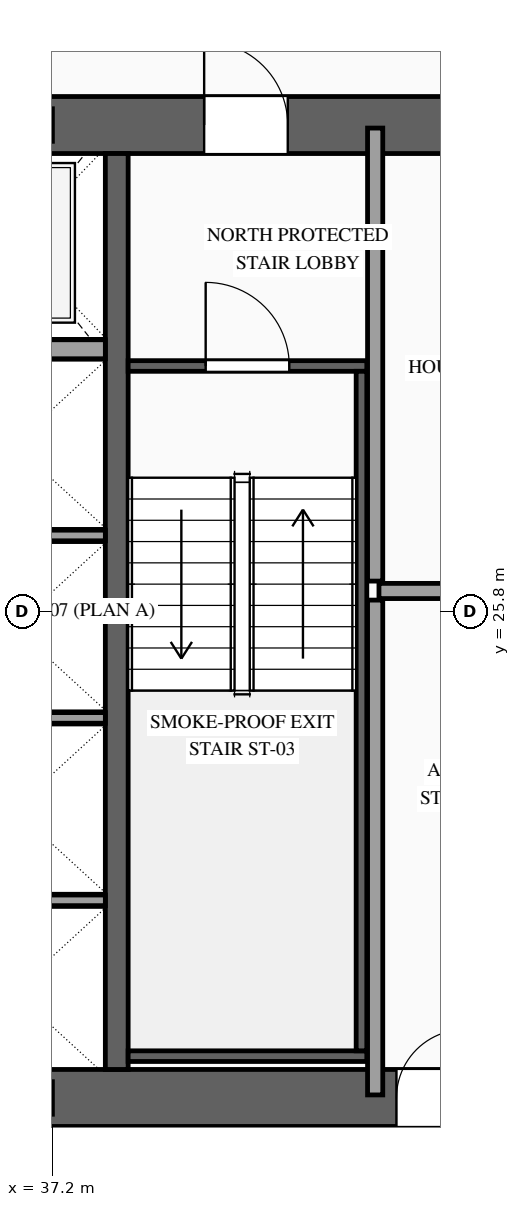
"""IFC4 building model, lengths in metres.
Left out: names, types, materials, properties, quantities, classifications, styles, units other than length and angle.
Written with IfcOpenShell. Run it as: python <this file> out.ifc"""

import sys

from ifc_helpers import new_model, si_unit, direction, frame, frame_2d, origin, origin_2d, place, context, subcontext, project, spatial, rectangle, i_section, extrude, source, transform, mapped, element, fill, save


model = new_model("IFC4")
c1 = context("Model", 3, precision=1e-05, world=origin(), true_north=direction((0.0, 1.0)))
c2 = subcontext(c1, "Body", "Model", "MODEL_VIEW")
j1 = project(units=[si_unit("LENGTHUNIT", "METRE"), si_unit("PLANEANGLEUNIT", "RADIAN")], contexts=[c1])
p1 = place(None, origin())
s1 = spatial("IfcSite", under=j1, at=p1, CompositionType="ELEMENT")
p2 = place(p1, origin())
s2 = spatial("IfcBuilding", under=s1, at=p2, CompositionType="ELEMENT")
p3 = place(p2, frame((0.0, 0.0, 97.4)))
s3 = spatial("IfcBuildingStorey", under=s2, at=p3, CompositionType="ELEMENT", Elevation=97.4)
p4 = place(p3, frame((23.425, 19.4, 0.0), z_axis=(0.0, 0.0, 1.0), x_axis=(1.0, 0.0, 0.0)))
e1 = element("IfcWall", 1, at=p4, inside=s3, PredefinedType="SHEAR", context=c2, shape_type="SweptSolid", body=[
    extrude(rectangle(XDim=27.15, YDim=0.75, at=frame_2d((13.575, 0.0))), origin(), (0.0, 0.0, 1.0), 3.6),
])
p5 = place(p4, frame((2.025, 0.0, 0.0)))
e2 = element("IfcOpeningElement", 2, at=p5, cuts=e1, PredefinedType="OPENING", context=c2, shape_type="SweptSolid", body=[
    extrude(rectangle(XDim=1.1, YDim=2.2, at=frame_2d((0.55, 1.1))), frame((0.0, 0.39, 0.0), z_axis=(0.0, -1.0, 0.0), x_axis=(1.0, 0.0, 0.0)), (0.0, 0.0, 1.0), 0.78),
])
p6 = place(p4, frame((9.925, 0.0, 0.0)))
e3 = element("IfcOpeningElement", 3, at=p6, cuts=e1, PredefinedType="OPENING", context=c2, shape_type="SweptSolid", body=[
    extrude(rectangle(XDim=1.1, YDim=2.2, at=frame_2d((0.55, 1.1))), frame((0.0, 0.39, 0.0), z_axis=(0.0, -1.0, 0.0), x_axis=(1.0, 0.0, 0.0)), (0.0, 0.0, 1.0), 0.78),
])
p7 = place(p4, frame((23.125, 0.0, 0.0)))
e4 = element("IfcOpeningElement", 4, at=p7, cuts=e1, PredefinedType="OPENING", context=c2, shape_type="SweptSolid", body=[
    extrude(rectangle(XDim=1.1, YDim=2.2, at=frame_2d((0.55, 1.1))), frame((0.0, 0.39, 0.0), z_axis=(0.0, -1.0, 0.0), x_axis=(1.0, 0.0, 0.0)), (0.0, 0.0, 1.0), 0.78),
])
p8 = place(p4, frame((19.745, 0.0, 0.0)))
e5 = element("IfcOpeningElement", 5, at=p8, cuts=e1, PredefinedType="OPENING", context=c2, shape_type="SweptSolid", body=[
    extrude(rectangle(XDim=0.9, YDim=2.15, at=frame_2d((0.45, 1.075))), frame((0.0, 0.39, 0.0), z_axis=(0.0, -1.0, 0.0), x_axis=(1.0, 0.0, 0.0)), (0.0, 0.0, 1.0), 0.78),
])
p9 = place(p4, frame((18.305, 0.0, 0.0)))
e6 = element("IfcOpeningElement", 6, at=p9, cuts=e1, PredefinedType="OPENING", context=c2, shape_type="SweptSolid", body=[
    extrude(rectangle(XDim=0.9, YDim=2.15, at=frame_2d((0.45, 1.075))), frame((0.0, 0.39, 0.0), z_axis=(0.0, -1.0, 0.0), x_axis=(1.0, 0.0, 0.0)), (0.0, 0.0, 1.0), 0.78),
])
p10 = place(p3, frame((23.425, 32.2, 0.0), z_axis=(0.0, 0.0, 1.0), x_axis=(1.0, 0.0, 0.0)))
e7 = element("IfcWall", 7, at=p10, inside=s3, PredefinedType="SHEAR", context=c2, shape_type="SweptSolid", body=[
    extrude(rectangle(XDim=27.15, YDim=0.75, at=frame_2d((13.575, 0.0))), origin(), (0.0, 0.0, 1.0), 3.6),
])
p11 = place(p10, frame((4.645, 0.0, 0.0)))
e8 = element("IfcOpeningElement", 8, at=p11, cuts=e7, PredefinedType="OPENING", context=c2, shape_type="SweptSolid", body=[
    extrude(rectangle(XDim=0.9, YDim=2.15, at=frame_2d((0.45, 1.075))), frame((0.0, 0.39, 0.0), z_axis=(0.0, -1.0, 0.0), x_axis=(1.0, 0.0, 0.0)), (0.0, 0.0, 1.0), 0.78),
])
p12 = place(p10, frame((9.925, 0.0, 0.0)))
e9 = element("IfcOpeningElement", 9, at=p12, cuts=e7, PredefinedType="OPENING", context=c2, shape_type="SweptSolid", body=[
    extrude(rectangle(XDim=1.1, YDim=2.2, at=frame_2d((0.55, 1.1))), frame((0.0, 0.39, 0.0), z_axis=(0.0, -1.0, 0.0), x_axis=(1.0, 0.0, 0.0)), (0.0, 0.0, 1.0), 0.78),
])
p13 = place(p10, frame((15.775, 0.0, 0.0)))
e10 = element("IfcOpeningElement", 10, at=p13, cuts=e7, PredefinedType="OPENING", context=c2, shape_type="SweptSolid", body=[
    extrude(rectangle(XDim=1.1, YDim=2.2, at=frame_2d((0.55, 1.1))), frame((0.0, 0.39, 0.0), z_axis=(0.0, -1.0, 0.0), x_axis=(1.0, 0.0, 0.0)), (0.0, 0.0, 1.0), 0.78),
])
p14 = place(p10, frame((18.975, 0.0, 0.0)))
e11 = element("IfcOpeningElement", 11, at=p14, cuts=e7, PredefinedType="OPENING", context=c2, shape_type="SweptSolid", body=[
    extrude(rectangle(XDim=0.9, YDim=2.15, at=frame_2d((0.45, 1.075))), frame((0.0, 0.39, 0.0), z_axis=(0.0, -1.0, 0.0), x_axis=(1.0, 0.0, 0.0)), (0.0, 0.0, 1.0), 0.78),
])
m1 = source(origin(), c2, "Body", "SweptSolid", [
    extrude(rectangle(XDim=12.05, YDim=0.3, at=frame_2d((6.025, 0.0))), origin(), (0.0, 0.0, 1.0), 3.6),
])
p15 = place(p3, frame((38.05, 19.775, 0.0), z_axis=(0.0, 0.0, 1.0), x_axis=(0.0, 1.0, 0.0)))
e12 = element("IfcWall", 12, at=p15, inside=s3, PredefinedType="SOLIDWALL", context=c2, shape_type="MappedRepresentation", body=[
    mapped(m1, transform((0.0, 0.0, 0.0), scale=1.0)),
])
m2 = source(origin(), c2, "Body", "SweptSolid", [
    extrude(i_section(OverallWidth=0.407, OverallDepth=0.428, WebThickness=0.02, FlangeThickness=0.035, at=origin_2d()), origin(), (0.0, 0.0, 1.0), 3.6),
])
for number, where, z_axis, x_axis in (
    (13, (37.0, 19.4, 0.0), (0.0, 0.0, 1.0), (1.0, 0.0, 0.0)),
    (14, (37.0, 32.2, 0.0), (0.0, 0.0, 1.0), (1.0, 0.0, 0.0)),
):
    element("IfcColumn", number, at=place(p3, frame(where, z_axis=z_axis, x_axis=x_axis)), inside=s3, PredefinedType="COLUMN", context=c2, shape_type="MappedRepresentation", body=[
        mapped(m2, transform((0.0, 0.0, 0.0), scale=1.0)),
    ])
m3 = source(origin(), c2, "Body", "SweptSolid", [
    extrude(rectangle(XDim=2.4, YDim=0.14, at=frame_2d((1.2, 0.0))), origin(), (0.0, 0.0, 1.0), 3.38),
])
for number, where, z_axis, x_axis in (
    (15, (35.5, 22.0, 0.0), (0.0, 0.0, 1.0), (1.0, 0.0, 0.0)),
    (16, (35.5, 24.4, 0.0), (0.0, 0.0, 1.0), (1.0, 0.0, 0.0)),
    (17, (35.5, 26.8, 0.0), (0.0, 0.0, 1.0), (1.0, 0.0, 0.0)),
):
    element("IfcWall", number, at=place(p3, frame(where, z_axis=z_axis, x_axis=x_axis)), inside=s3, PredefinedType="SOLIDWALL", context=c2, shape_type="MappedRepresentation", body=[
        mapped(m3, transform((0.0, 0.0, 0.0), scale=1.0)),
    ])
m4 = source(origin(), c2, "Body", "SweptSolid", [
    extrude(rectangle(XDim=2.4, YDim=0.25, at=frame_2d((1.2, 0.0))), origin(), (0.0, 0.0, 1.0), 3.38),
])
p16 = place(p3, frame((35.5, 29.25, 0.0), z_axis=(0.0, 0.0, 1.0), x_axis=(1.0, 0.0, 0.0)))
e18 = element("IfcWall", 18, at=p16, inside=s3, PredefinedType="SOLIDWALL", context=c2, shape_type="MappedRepresentation", body=[
    mapped(m4, transform((0.0, 0.0, 0.0), scale=1.0)),
])
p17 = place(p3, frame((38.2, 29.03, 0.0), z_axis=(0.0, 0.0, 1.0), x_axis=(1.0, 0.0, 0.0)))
e19 = element("IfcWall", 19, at=p17, inside=s3, PredefinedType="SOLIDWALL", context=c2, shape_type="SweptSolid", body=[
    extrude(rectangle(XDim=3.14, YDim=0.14, at=frame_2d((1.57, 0.0))), origin(), (0.0, 0.0, 1.0), 3.38),
])
p18 = place(p17, frame((1.02, 0.0, 0.0)))
e20 = element("IfcOpeningElement", 20, at=p18, cuts=e19, PredefinedType="OPENING", context=c2, shape_type="SweptSolid", body=[
    extrude(rectangle(XDim=1.1, YDim=2.2, at=frame_2d((0.55, 1.1))), frame((0.0, 0.085, 0.0), z_axis=(0.0, -1.0, 0.0), x_axis=(1.0, 0.0, 0.0)), (0.0, 0.0, 1.0), 0.17),
])
m5 = source(origin(), c2, "Body", "SweptSolid", [
    extrude(rectangle(XDim=3.14, YDim=0.14, at=frame_2d((1.57, 0.0))), origin(), (0.0, 0.0, 1.0), 3.38),
])
p19 = place(p3, frame((38.2, 19.95, 0.0), z_axis=(0.0, 0.0, 1.0), x_axis=(1.0, 0.0, 0.0)))
e21 = element("IfcWall", 21, at=p19, inside=s3, PredefinedType="SOLIDWALL", context=c2, shape_type="MappedRepresentation", body=[
    mapped(m5, transform((0.0, 0.0, 0.0), scale=1.0)),
])
m6 = source(origin(), c2, "Body", "SweptSolid", [
    extrude(rectangle(XDim=8.94, YDim=0.14, at=frame_2d((4.47, 0.0))), origin(), (0.0, 0.0, 1.0), 3.38),
])
p20 = place(p3, frame((41.27, 20.02, 0.0), z_axis=(0.0, 0.0, 1.0), x_axis=(0.0, 1.0, 0.0)))
e22 = element("IfcWall", 22, at=p20, inside=s3, PredefinedType="SOLIDWALL", context=c2, shape_type="MappedRepresentation", body=[
    mapped(m6, transform((0.0, 0.0, 0.0), scale=1.0)),
])
m7 = source(origin(), c2, "Body", "SweptSolid", [
    extrude(rectangle(XDim=6.51, YDim=0.2, at=frame_2d((3.255, 0.0))), origin(), (0.0, 0.0, 1.0), 3.38),
])
p21 = place(p3, frame((41.45, 19.44, 0.0), z_axis=(0.0, 0.0, 1.0), x_axis=(0.0, 1.0, 0.0)))
e23 = element("IfcWall", 23, at=p21, inside=s3, PredefinedType="PARTITIONING", context=c2, shape_type="MappedRepresentation", body=[
    mapped(m7, transform((0.0, 0.0, 0.0), scale=1.0)),
])
m8 = source(origin(), c2, "Body", "SweptSolid", [
    extrude(rectangle(XDim=2.7, YDim=0.2, at=frame_2d((1.35, 0.0))), origin(), (0.0, 0.0, 1.0), 3.38),
])
p22 = place(p3, frame((41.5, 26.07, 0.0), z_axis=(0.0, 0.0, 1.0), x_axis=(1.0, 0.0, 0.0)))
e24 = element("IfcWall", 24, at=p22, inside=s3, PredefinedType="PARTITIONING", context=c2, shape_type="MappedRepresentation", body=[
    mapped(m8, transform((0.0, 0.0, 0.0), scale=1.0)),
])
m9 = source(origin(), c2, "Body", "SweptSolid", [
    extrude(rectangle(XDim=5.96, YDim=0.2, at=frame_2d((2.98, 0.0))), origin(), (0.0, 0.0, 1.0), 3.38),
])
p23 = place(p3, frame((41.45, 26.2, 0.0), z_axis=(0.0, 0.0, 1.0), x_axis=(0.0, 1.0, 0.0)))
e25 = element("IfcWall", 25, at=p23, inside=s3, PredefinedType="PARTITIONING", context=c2, shape_type="MappedRepresentation", body=[
    mapped(m9, transform((0.0, 0.0, 0.0), scale=1.0)),
])
m10 = source(origin(), c2, "Body", "SweptSolid", [
    extrude(rectangle(XDim=1.1, YDim=2.2, at=frame_2d((0.55, 1.1))), frame((0.0, 0.025, 0.0), z_axis=(0.0, -1.0, 0.0), x_axis=(1.0, 0.0, 0.0)), (0.0, 0.0, 1.0), 0.05),
])
p24 = place(p18, origin())
e26 = element("IfcDoor", 26, at=p24, inside=s3, OperationType="SINGLE_SWING_LEFT", PredefinedType="DOOR", context=c2, shape_type="MappedRepresentation", body=[
    mapped(m10, transform((0.0, 0.0, 0.0), scale=1.0)),
])
fill(e20, e26)
p25 = place(p13, origin())
e27 = element("IfcDoor", 27, at=p25, inside=s3, OperationType="SINGLE_SWING_LEFT", PredefinedType="DOOR", context=c2, shape_type="MappedRepresentation", body=[
    mapped(m10, transform((0.0, 0.0, 0.0), scale=1.0)),
])
fill(e10, e27)
m11 = source(origin(), c2, "Body", "SweptSolid", [
    extrude(rectangle(XDim=0.9, YDim=2.15, at=frame_2d((0.45, 1.075))), frame((0.0, 0.025, 0.0), z_axis=(0.0, -1.0, 0.0), x_axis=(1.0, 0.0, 0.0)), (0.0, 0.0, 1.0), 0.05),
])
p26 = place(p9, origin())
e28 = element("IfcDoor", 28, at=p26, inside=s3, OperationType="SINGLE_SWING_RIGHT", PredefinedType="DOOR", context=c2, shape_type="MappedRepresentation", body=[
    mapped(m11, transform((0.0, 0.0, 0.0), scale=1.0)),
])
fill(e6, e28)
save(model, sys.argv[1])
